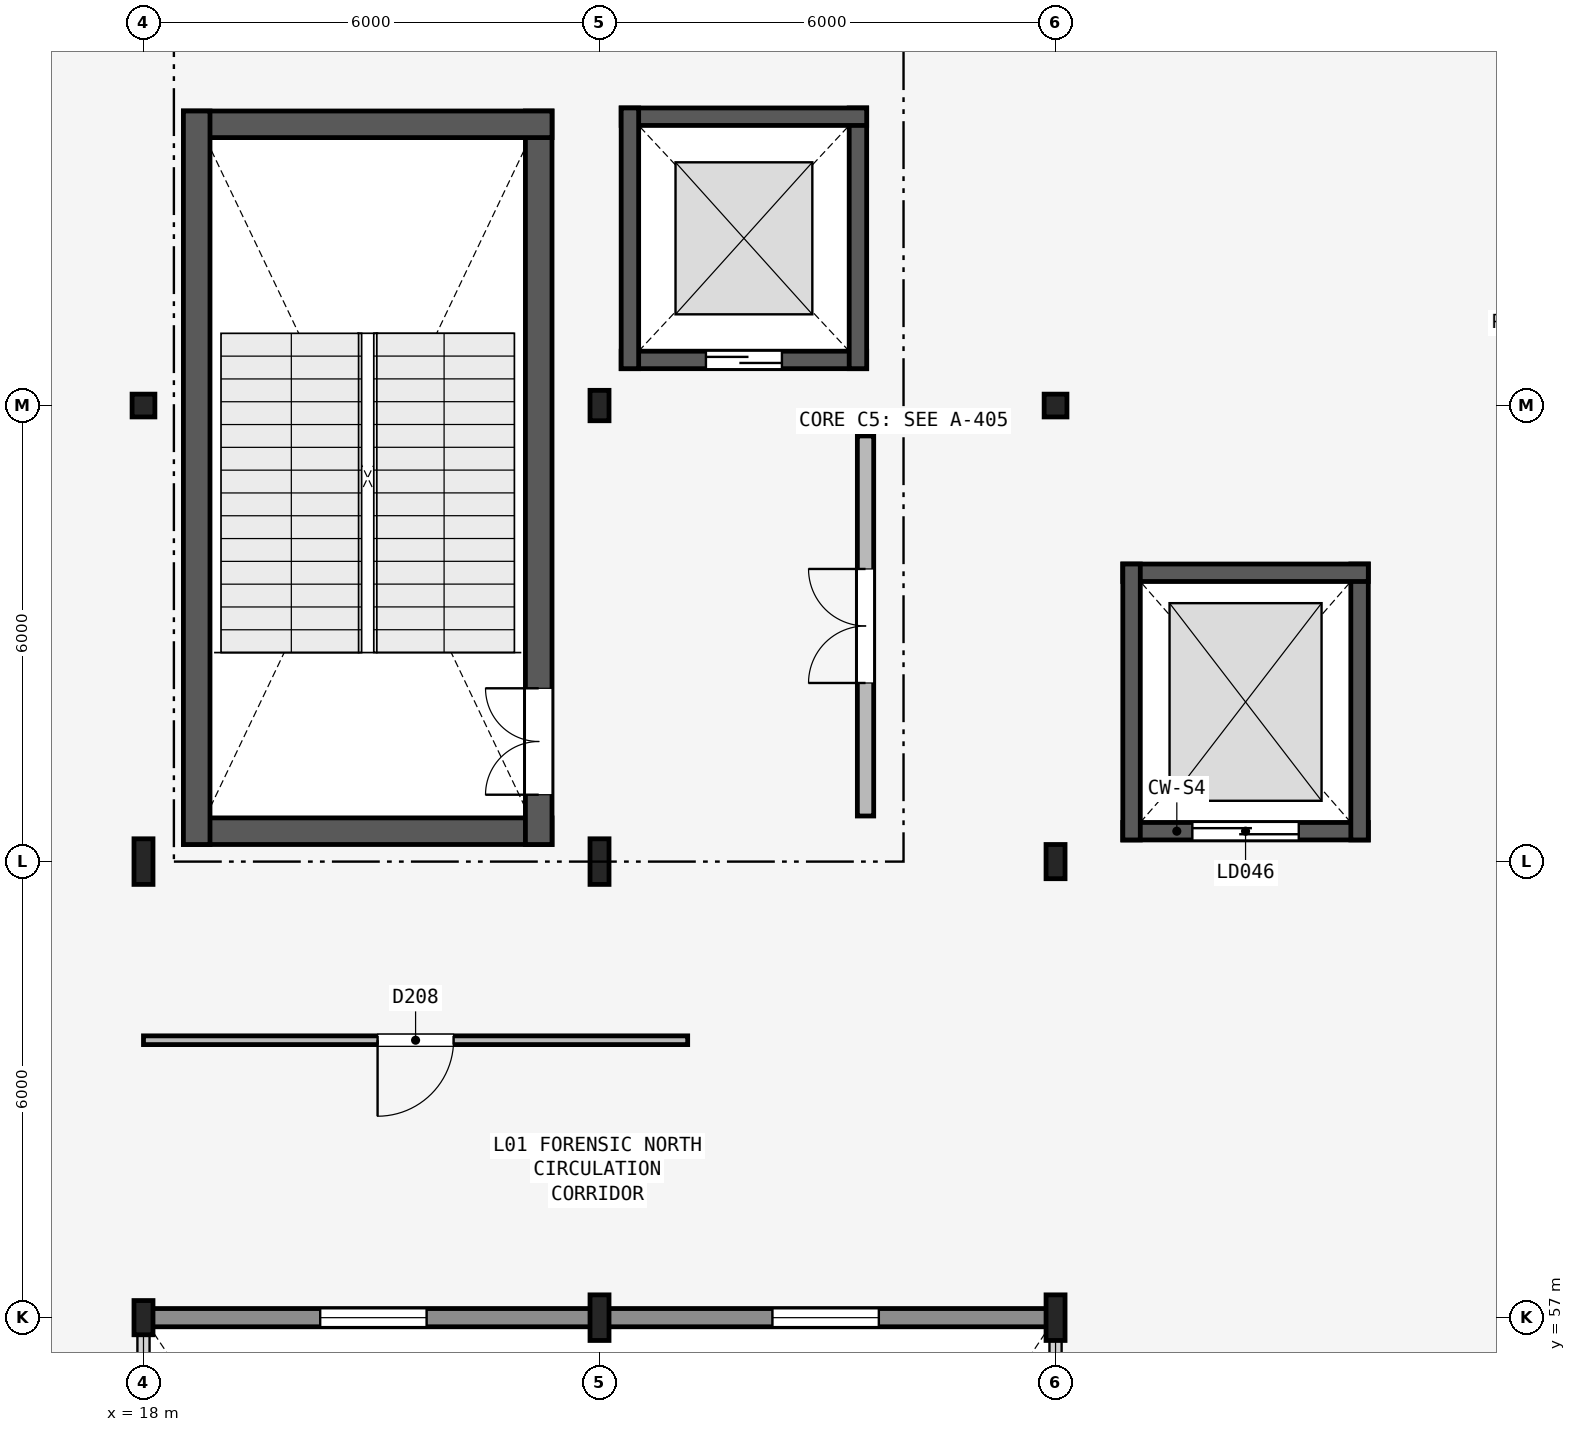
"""IFC4 building model, lengths in metres.
Left out: names, types, materials, properties, quantities, classifications, styles, units other than length and angle.
Written with IfcOpenShell. Run it as: python <this file> out.ifc"""

import sys

from ifc_helpers import new_model, si_unit, direction, frame, frame_2d, origin, origin_2d, place, context, subcontext, project, spatial, rectangle, hollow_rectangle, i_section, extrude, element, fill, save


model = new_model("IFC4")
c1 = context("Model", 3, precision=1e-05, world=origin(), true_north=direction((0.0, 1.0)))
c2 = subcontext(c1, "Body", "Model", "MODEL_VIEW")
j1 = project(units=[si_unit("LENGTHUNIT", "METRE"), si_unit("PLANEANGLEUNIT", "RADIAN")], contexts=[c1])
p1 = place(None, origin())
s1 = spatial("IfcSite", under=j1, at=p1, CompositionType="ELEMENT")
p2 = place(p1, origin())
s2 = spatial("IfcBuilding", under=s1, at=p2, CompositionType="ELEMENT")
p3 = place(p2, frame((0.0, 0.0, 4.8)))
s3 = spatial("IfcBuildingStorey", under=s2, at=p3, CompositionType="ELEMENT", Elevation=4.8)
p4 = place(p3, frame((18.0, 57.0, 0.0), z_axis=(0.0, 0.0, 1.0), x_axis=(1.0, 0.0, 0.0)))
e1 = element("IfcColumn", 1, at=p4, inside=s3, PredefinedType="COLUMN", context=c2, shape_type="SweptSolid", body=[
    extrude(i_section(OverallWidth=0.25, OverallDepth=0.45, WebThickness=0.011, FlangeThickness=0.014, FilletRadius=0.015, at=origin_2d()), origin(), (0.0, 0.0, 1.0), 4.5),
])
p5 = place(p3, frame((18.0, 63.0, 0.0), z_axis=(0.0, 0.0, 1.0), x_axis=(1.0, 0.0, 0.0)))
e2 = element("IfcColumn", 2, at=p5, inside=s3, PredefinedType="COLUMN", context=c2, shape_type="SweptSolid", body=[
    extrude(i_section(OverallWidth=0.25, OverallDepth=0.6, WebThickness=0.012, FlangeThickness=0.024, FilletRadius=0.017, at=origin_2d()), origin(), (0.0, 0.0, 1.0), 4.5),
])
p6 = place(p3, frame((18.0, 69.0, 0.0), z_axis=(0.0, 0.0, 1.0), x_axis=(1.0, 0.0, 0.0)))
e3 = element("IfcColumn", 3, at=p6, inside=s3, PredefinedType="COLUMN", context=c2, shape_type="SweptSolid", body=[
    extrude(hollow_rectangle(XDim=0.3, YDim=0.3, WallThickness=0.016, InnerFilletRadius=0.016, OuterFilletRadius=0.032, at=origin_2d()), origin(), (0.0, 0.0, 1.0), 4.5),
])
for number, where, z_axis, x_axis in (
    (4, (24.0, 57.0, 0.0), (0.0, 0.0, 1.0), (1.0, 0.0, 0.0)),
    (5, (24.0, 63.0, 0.0), (0.0, 0.0, 1.0), (1.0, 0.0, 0.0)),
):
    element("IfcColumn", number, at=place(p3, frame(where, z_axis=z_axis, x_axis=x_axis)), inside=s3, PredefinedType="COLUMN", context=c2, shape_type="SweptSolid", body=[
        extrude(i_section(OverallWidth=0.25, OverallDepth=0.6, WebThickness=0.012, FlangeThickness=0.024, FilletRadius=0.017, at=origin_2d()), origin(), (0.0, 0.0, 1.0), 4.5),
    ])
p7 = place(p3, frame((24.0, 69.0, 0.0), z_axis=(0.0, 0.0, 1.0), x_axis=(1.0, 0.0, 0.0)))
e6 = element("IfcColumn", 6, at=p7, inside=s3, PredefinedType="COLUMN", context=c2, shape_type="SweptSolid", body=[
    extrude(i_section(OverallWidth=0.25, OverallDepth=0.4, WebThickness=0.01, FlangeThickness=0.013, FilletRadius=0.014, at=origin_2d()), origin(), (0.0, 0.0, 1.0), 4.5),
])
p8 = place(p3, frame((30.0, 57.0, 0.0), z_axis=(0.0, 0.0, 1.0), x_axis=(1.0, 0.0, 0.0)))
e7 = element("IfcColumn", 7, at=p8, inside=s3, PredefinedType="COLUMN", context=c2, shape_type="SweptSolid", body=[
    extrude(i_section(OverallWidth=0.25, OverallDepth=0.6, WebThickness=0.012, FlangeThickness=0.024, FilletRadius=0.017, at=origin_2d()), origin(), (0.0, 0.0, 1.0), 4.5),
])
p9 = place(p3, frame((30.0, 63.0, 0.0), z_axis=(0.0, 0.0, 1.0), x_axis=(1.0, 0.0, 0.0)))
e8 = element("IfcColumn", 8, at=p9, inside=s3, PredefinedType="COLUMN", context=c2, shape_type="SweptSolid", body=[
    extrude(i_section(OverallWidth=0.25, OverallDepth=0.45, WebThickness=0.011, FlangeThickness=0.014, FilletRadius=0.015, at=origin_2d()), origin(), (0.0, 0.0, 1.0), 4.5),
])
p10 = place(p3, frame((30.0, 69.0, 0.0), z_axis=(0.0, 0.0, 1.0), x_axis=(1.0, 0.0, 0.0)))
e9 = element("IfcColumn", 9, at=p10, inside=s3, PredefinedType="COLUMN", context=c2, shape_type="SweptSolid", body=[
    extrude(hollow_rectangle(XDim=0.3, YDim=0.3, WallThickness=0.016, InnerFilletRadius=0.016, OuterFilletRadius=0.032, at=origin_2d()), origin(), (0.0, 0.0, 1.0), 4.5),
])
p11 = place(p3, frame((18.05, 57.0, 0.0), z_axis=(0.0, 0.0, 1.0), x_axis=(1.0, 0.0, 0.0)))
e10 = element("IfcWall", 10, at=p11, inside=s3, PredefinedType="SOLIDWALL", context=c2, shape_type="SweptSolid", body=[
    extrude(rectangle(XDim=5.95, YDim=0.24, at=frame_2d((2.975, 0.0))), origin(), (0.0, 0.0, 1.0), 3.59),
])
p12 = place(p11, frame((2.275, 0.0, 0.85)))
e11 = element("IfcOpeningElement", 11, at=p12, cuts=e10, PredefinedType="OPENING", context=c2, shape_type="SweptSolid", body=[
    extrude(rectangle(XDim=1.4, YDim=1.8, at=frame_2d((0.7, 0.9))), frame((0.0, 0.13, 0.0), z_axis=(0.0, -1.0, 0.0), x_axis=(1.0, 0.0, 0.0)), (0.0, 0.0, 1.0), 0.26),
])
p13 = place(p3, frame((24.0, 57.0, 0.0), z_axis=(0.0, 0.0, 1.0), x_axis=(1.0, 0.0, 0.0)))
e12 = element("IfcWall", 12, at=p13, inside=s3, PredefinedType="SOLIDWALL", context=c2, shape_type="SweptSolid", body=[
    extrude(rectangle(XDim=5.95, YDim=0.24, at=frame_2d((2.975, 0.0))), origin(), (0.0, 0.0, 1.0), 3.59),
])
p14 = place(p13, frame((2.275, 0.0, 0.85)))
e13 = element("IfcOpeningElement", 13, at=p14, cuts=e12, PredefinedType="OPENING", context=c2, shape_type="SweptSolid", body=[
    extrude(rectangle(XDim=1.4, YDim=1.8, at=frame_2d((0.7, 0.9))), frame((0.0, 0.13, 0.0), z_axis=(0.0, -1.0, 0.0), x_axis=(1.0, 0.0, 0.0)), (0.0, 0.0, 1.0), 0.26),
])
p15 = place(p3, frame((18.525, 63.4, 0.0), z_axis=(0.0, 0.0, 1.0), x_axis=(1.0, 0.0, 0.0)))
e14 = element("IfcWall", 14, at=p15, inside=s3, PredefinedType="SHEAR", context=c2, shape_type="SweptSolid", body=[
    extrude(rectangle(XDim=4.85, YDim=0.35, at=frame_2d((2.425, 0.0))), origin(), (0.0, 0.0, 1.0), 4.36),
])
p16 = place(p3, frame((23.2, 63.225, 0.0), z_axis=(0.0, 0.0, 1.0), x_axis=(0.0, 1.0, 0.0)))
e15 = element("IfcWall", 15, at=p16, inside=s3, PredefinedType="SHEAR", context=c2, shape_type="SweptSolid", body=[
    extrude(rectangle(XDim=9.65, YDim=0.35, at=frame_2d((4.825, 0.0))), origin(), (0.0, 0.0, 1.0), 4.36),
])
p17 = place(p16, frame((0.655, 0.0, 0.0)))
e16 = element("IfcOpeningElement", 16, at=p17, cuts=e15, PredefinedType="OPENING", context=c2, shape_type="SweptSolid", body=[
    extrude(rectangle(XDim=1.4, YDim=2.2, at=frame_2d((0.7, 1.1))), frame((0.0, 0.185, 0.0), z_axis=(0.0, -1.0, 0.0), x_axis=(1.0, 0.0, 0.0)), (0.0, 0.0, 1.0), 0.37),
])
p18 = place(p3, frame((23.375, 72.7, 0.0), z_axis=(0.0, 0.0, 1.0), x_axis=(-1.0, 0.0, 0.0)))
e17 = element("IfcWall", 17, at=p18, inside=s3, PredefinedType="SHEAR", context=c2, shape_type="SweptSolid", body=[
    extrude(rectangle(XDim=4.85, YDim=0.35, at=frame_2d((2.425, 0.0))), origin(), (0.0, 0.0, 1.0), 4.36),
])
p19 = place(p3, frame((18.7, 72.875, 0.0), z_axis=(0.0, 0.0, 1.0), x_axis=(0.0, -1.0, 0.0)))
e18 = element("IfcWall", 18, at=p19, inside=s3, PredefinedType="SHEAR", context=c2, shape_type="SweptSolid", body=[
    extrude(rectangle(XDim=9.65, YDim=0.35, at=frame_2d((4.825, 0.0))), origin(), (0.0, 0.0, 1.0), 4.36),
])
p20 = place(p3, frame((27.5, 63.6, 0.0), z_axis=(0.0, 0.0, 1.0), x_axis=(0.0, 1.0, 0.0)))
e19 = element("IfcWall", 19, at=p20, inside=s3, PredefinedType="PARTITIONING", context=c2, shape_type="SweptSolid", body=[
    extrude(rectangle(XDim=5.0, YDim=0.215, at=frame_2d((2.5, 0.0))), origin(), (0.0, 0.0, 1.0), 4.19),
])
p21 = place(p20, frame((1.75, 0.0, 0.0)))
e20 = element("IfcOpeningElement", 20, at=p21, cuts=e19, PredefinedType="OPENING", context=c2, shape_type="SweptSolid", body=[
    extrude(rectangle(XDim=1.5, YDim=2.15, at=frame_2d((0.75, 1.075))), frame((0.0, 0.117, 0.0), z_axis=(0.0, -1.0, 0.0), x_axis=(1.0, 0.0, 0.0)), (0.0, 0.0, 1.0), 0.235),
])
p22 = place(p3, frame((24.285, 69.6, 0.0), z_axis=(0.0, 0.0, 1.0), x_axis=(1.0, 0.0, 0.0)))
e21 = element("IfcWall", 21, at=p22, inside=s3, PredefinedType="SHEAR", context=c2, shape_type="SweptSolid", body=[
    extrude(rectangle(XDim=3.23, YDim=0.23, at=frame_2d((1.615, 0.0))), origin(), (0.0, 0.0, 1.0), 4.5),
])
p23 = place(p22, frame((1.115, 0.0, 0.0)))
e22 = element("IfcOpeningElement", 22, at=p23, cuts=e21, PredefinedType="OPENING", context=c2, shape_type="SweptSolid", body=[
    extrude(rectangle(XDim=1.0, YDim=2.15, at=frame_2d((0.5, 1.075))), frame((0.0, 0.125, 0.0), z_axis=(0.0, -1.0, 0.0), x_axis=(1.0, 0.0, 0.0)), (0.0, 0.0, 1.0), 0.25),
])
p24 = place(p3, frame((27.4, 69.485, 0.0), z_axis=(0.0, 0.0, 1.0), x_axis=(0.0, 1.0, 0.0)))
e23 = element("IfcWall", 23, at=p24, inside=s3, PredefinedType="SHEAR", context=c2, shape_type="SweptSolid", body=[
    extrude(rectangle(XDim=3.43, YDim=0.23, at=frame_2d((1.715, 0.0))), origin(), (0.0, 0.0, 1.0), 4.5),
])
p25 = place(p3, frame((27.515, 72.8, 0.0), z_axis=(0.0, 0.0, 1.0), x_axis=(-1.0, 0.0, 0.0)))
e24 = element("IfcWall", 24, at=p25, inside=s3, PredefinedType="SHEAR", context=c2, shape_type="SweptSolid", body=[
    extrude(rectangle(XDim=3.23, YDim=0.23, at=frame_2d((1.615, 0.0))), origin(), (0.0, 0.0, 1.0), 4.5),
])
p26 = place(p3, frame((24.4, 72.915, 0.0), z_axis=(0.0, 0.0, 1.0), x_axis=(0.0, -1.0, 0.0)))
e25 = element("IfcWall", 25, at=p26, inside=s3, PredefinedType="SHEAR", context=c2, shape_type="SweptSolid", body=[
    extrude(rectangle(XDim=3.43, YDim=0.23, at=frame_2d((1.715, 0.0))), origin(), (0.0, 0.0, 1.0), 4.5),
])
p27 = place(p3, frame((30.885, 63.4, 0.0), z_axis=(0.0, 0.0, 1.0), x_axis=(1.0, 0.0, 0.0)))
e26 = element("IfcWall", 26, at=p27, inside=s3, PredefinedType="SHEAR", context=c2, shape_type="SweptSolid", body=[
    extrude(rectangle(XDim=3.23, YDim=0.23, at=frame_2d((1.615, 0.0))), origin(), (0.0, 0.0, 1.0), 4.5),
])
p28 = place(p27, frame((0.915, 0.0, 0.0)))
e27 = element("IfcOpeningElement", 27, at=p28, cuts=e26, PredefinedType="OPENING", context=c2, shape_type="SweptSolid", body=[
    extrude(rectangle(XDim=1.4, YDim=2.3, at=frame_2d((0.7, 1.15))), frame((0.0, 0.125, 0.0), z_axis=(0.0, -1.0, 0.0), x_axis=(1.0, 0.0, 0.0)), (0.0, 0.0, 1.0), 0.25),
])
p29 = place(p3, frame((34.0, 63.285, 0.0), z_axis=(0.0, 0.0, 1.0), x_axis=(0.0, 1.0, 0.0)))
e28 = element("IfcWall", 28, at=p29, inside=s3, PredefinedType="SHEAR", context=c2, shape_type="SweptSolid", body=[
    extrude(rectangle(XDim=3.63, YDim=0.23, at=frame_2d((1.815, 0.0))), origin(), (0.0, 0.0, 1.0), 4.5),
])
p30 = place(p3, frame((34.115, 66.8, 0.0), z_axis=(0.0, 0.0, 1.0), x_axis=(-1.0, 0.0, 0.0)))
e29 = element("IfcWall", 29, at=p30, inside=s3, PredefinedType="SHEAR", context=c2, shape_type="SweptSolid", body=[
    extrude(rectangle(XDim=3.23, YDim=0.23, at=frame_2d((1.615, 0.0))), origin(), (0.0, 0.0, 1.0), 4.5),
])
p31 = place(p3, frame((31.0, 66.915, 0.0), z_axis=(0.0, 0.0, 1.0), x_axis=(0.0, -1.0, 0.0)))
e30 = element("IfcWall", 30, at=p31, inside=s3, PredefinedType="SHEAR", context=c2, shape_type="SweptSolid", body=[
    extrude(rectangle(XDim=3.63, YDim=0.23, at=frame_2d((1.815, 0.0))), origin(), (0.0, 0.0, 1.0), 4.5),
])
p32 = place(p3, frame((25.16, 60.65, 0.0), z_axis=(0.0, 0.0, 1.0), x_axis=(-1.0, 0.0, 0.0)))
e31 = element("IfcWall", 31, at=p32, inside=s3, PredefinedType="PARTITIONING", context=c2, shape_type="SweptSolid", body=[
    extrude(rectangle(XDim=7.16, YDim=0.115, at=frame_2d((3.58, 0.0))), origin(), (0.0, 0.0, 1.0), 3.74),
])
p33 = place(p32, frame((3.08, 0.0, 0.0)))
e32 = element("IfcOpeningElement", 32, at=p33, cuts=e31, PredefinedType="OPENING", context=c2, shape_type="SweptSolid", body=[
    extrude(rectangle(XDim=1.0, YDim=2.15, at=frame_2d((0.5, 1.075))), frame((0.0, 0.067, 0.0), z_axis=(0.0, -1.0, 0.0), x_axis=(1.0, 0.0, 0.0)), (0.0, 0.0, 1.0), 0.135),
])
p34 = place(p12, origin())
e33 = element("IfcWindow", 33, at=p34, inside=s3, PartitioningType="SINGLE_PANEL", PredefinedType="WINDOW", context=c2, shape_type="SweptSolid", body=[
    extrude(rectangle(XDim=1.4, YDim=1.8, at=frame_2d((0.7, 0.9))), frame((0.0, 0.03, 0.0), z_axis=(0.0, -1.0, 0.0), x_axis=(1.0, 0.0, 0.0)), (0.0, 0.0, 1.0), 0.06),
])
fill(e11, e33)
p35 = place(p14, origin())
e34 = element("IfcWindow", 34, at=p35, inside=s3, PartitioningType="SINGLE_PANEL", PredefinedType="WINDOW", context=c2, shape_type="SweptSolid", body=[
    extrude(rectangle(XDim=1.4, YDim=1.8, at=frame_2d((0.7, 0.9))), frame((0.0, 0.03, 0.0), z_axis=(0.0, -1.0, 0.0), x_axis=(1.0, 0.0, 0.0)), (0.0, 0.0, 1.0), 0.06),
])
fill(e13, e34)
p36 = place(p17, origin())
e35 = element("IfcDoor", 35, at=p36, inside=s3, OperationType="DOUBLE_DOOR_SINGLE_SWING", PredefinedType="DOOR", context=c2, shape_type="SweptSolid", body=[
    extrude(rectangle(XDim=1.4, YDim=2.2, at=frame_2d((0.7, 1.1))), frame((0.0, 0.025, 0.0), z_axis=(0.0, -1.0, 0.0), x_axis=(1.0, 0.0, 0.0)), (0.0, 0.0, 1.0), 0.05),
])
fill(e16, e35)
p37 = place(p21, origin())
e36 = element("IfcDoor", 36, at=p37, inside=s3, OperationType="DOUBLE_DOOR_SINGLE_SWING", PredefinedType="DOOR", context=c2, shape_type="SweptSolid", body=[
    extrude(rectangle(XDim=1.5, YDim=2.15, at=frame_2d((0.75, 1.075))), frame((0.0, 0.025, 0.0), z_axis=(0.0, -1.0, 0.0), x_axis=(1.0, 0.0, 0.0)), (0.0, 0.0, 1.0), 0.05),
])
fill(e20, e36)
p38 = place(p23, origin())
e37 = element("IfcDoor", 37, at=p38, inside=s3, OperationType="SLIDING_TO_LEFT", PredefinedType="DOOR", context=c2, shape_type="SweptSolid", body=[
    extrude(rectangle(XDim=1.0, YDim=2.15, at=frame_2d((0.5, 1.075))), frame((0.0, 0.025, 0.0), z_axis=(0.0, -1.0, 0.0), x_axis=(1.0, 0.0, 0.0)), (0.0, 0.0, 1.0), 0.05),
])
fill(e22, e37)
p39 = place(p28, origin())
e38 = element("IfcDoor", 38, at=p39, inside=s3, OperationType="SLIDING_TO_LEFT", PredefinedType="DOOR", context=c2, shape_type="SweptSolid", body=[
    extrude(rectangle(XDim=1.4, YDim=2.3, at=frame_2d((0.7, 1.15))), frame((0.0, 0.025, 0.0), z_axis=(0.0, -1.0, 0.0), x_axis=(1.0, 0.0, 0.0)), (0.0, 0.0, 1.0), 0.05),
])
fill(e27, e38)
p40 = place(p33, origin())
e39 = element("IfcDoor", 39, at=p40, inside=s3, OperationType="SINGLE_SWING_RIGHT", PredefinedType="DOOR", context=c2, shape_type="SweptSolid", body=[
    extrude(rectangle(XDim=1.0, YDim=2.15, at=frame_2d((0.5, 1.075))), frame((0.0, 0.025, 0.0), z_axis=(0.0, -1.0, 0.0), x_axis=(1.0, 0.0, 0.0)), (0.0, 0.0, 1.0), 0.05),
])
fill(e32, e39)
save(model, sys.argv[1])
